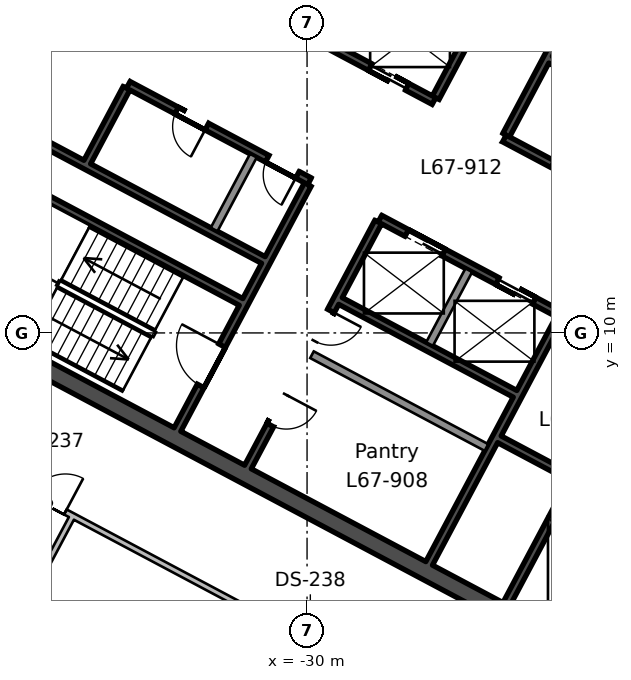
"""IFC4 building model, lengths in metres.
Left out: names, types, materials, properties, quantities, classifications, styles, units other than length and angle.
Written with IfcOpenShell. Run it as: python <this file> out.ifc"""

import sys

from ifc_helpers import new_model, si_unit, direction, frame, frame_2d, origin, place, context, subcontext, project, spatial, rectangle, extrude, element, fill, save


model = new_model("IFC4")
c1 = context("Model", 3, precision=1e-05, world=origin(), true_north=direction((0.0, 1.0)))
c2 = subcontext(c1, "Body", "Model", "MODEL_VIEW")
j1 = project(units=[si_unit("LENGTHUNIT", "METRE"), si_unit("PLANEANGLEUNIT", "RADIAN")], contexts=[c1])
p1 = place(None, origin())
s1 = spatial("IfcSite", under=j1, at=p1, CompositionType="ELEMENT")
p2 = place(p1, origin())
s2 = spatial("IfcBuilding", under=s1, at=p2, CompositionType="ELEMENT")
p3 = place(p2, frame((0.0, 0.0, 297.0)))
s3 = spatial("IfcBuildingStorey", under=s2, at=p3, CompositionType="ELEMENT", Elevation=297.0)
p4 = place(p3, frame((-32.004, 27.833, 0.0), z_axis=(0.0, 0.0, 1.0), x_axis=(-0.469467968382, -0.882949504028, 0.0)))
e1 = element("IfcWall", 1, at=p4, inside=s3, PredefinedType="SHEAR", context=c2, shape_type="SweptSolid", body=[
    extrude(rectangle(XDim=19.1, YDim=0.45, at=frame_2d((9.55, 0.0))), origin(), (0.0, 0.0, 1.0), 3.9),
])
p5 = place(p4, frame((10.15, 0.0, 0.0)))
e2 = element("IfcOpeningElement", 2, at=p5, cuts=e1, PredefinedType="OPENING", context=c2, shape_type="SweptSolid", body=[
    extrude(rectangle(XDim=2.4, YDim=2.4, at=frame_2d((1.2, 1.2))), frame((0.0, 0.235, 0.0), z_axis=(0.0, -1.0, 0.0), x_axis=(1.0, 0.0, 0.0)), (0.0, 0.0, 1.0), 0.47),
])
p6 = place(p3, frame((-22.832, 1.578, 0.0), z_axis=(0.0, 0.0, 1.0), x_axis=(-0.88294509198, 0.469476266226, 0.0)))
e3 = element("IfcWall", 3, at=p6, inside=s3, PredefinedType="SHEAR", context=c2, shape_type="SweptSolid", body=[
    extrude(rectangle(XDim=20.2, YDim=0.45, at=frame_2d((10.1, 0.0))), origin(), (0.0, 0.0, 1.0), 3.9),
])
p7 = place(p3, frame((-23.043, 6.08, 0.0), z_axis=(0.0, 0.0, 1.0), x_axis=(-0.469494272526, -0.882935517501, 0.0)))
e4 = element("IfcWall", 4, at=p7, inside=s3, PredefinedType="SHEAR", context=c2, shape_type="SweptSolid", body=[
    extrude(rectangle(XDim=3.65, YDim=0.2, at=frame_2d((1.825, 0.0))), origin(), (0.0, 0.0, 1.0), 3.9),
])
p8 = place(p3, frame((-23.36, 10.382, 0.0), z_axis=(0.0, 0.0, 1.0), x_axis=(-0.469480409012, -0.88294288918, 0.0)))
e5 = element("IfcWall", 5, at=p8, inside=s3, PredefinedType="SHEAR", context=c2, shape_type="SweptSolid", body=[
    extrude(rectangle(XDim=7.3, YDim=0.2, at=frame_2d((3.65, 0.0))), origin(), (0.0, 0.0, 1.0), 3.9),
])
p9 = place(p3, frame((-25.744, 11.65, 0.0), z_axis=(0.0, 0.0, 1.0), x_axis=(-0.469487830541, -0.882938942948, 0.0)))
e6 = element("IfcWall", 6, at=p9, inside=s3, PredefinedType="SOLIDWALL", context=c2, shape_type="SweptSolid", body=[
    extrude(rectangle(XDim=2.2, YDim=0.2, at=frame_2d((1.1, 0.0))), origin(), (0.0, 0.0, 1.0), 3.9),
])
p10 = place(p3, frame((-21.333, 21.649, 0.0), z_axis=(0.0, 0.0, 1.0), x_axis=(-0.469494272526, -0.882935517501, 0.0)))
e7 = element("IfcWall", 7, at=p10, inside=s3, PredefinedType="SHEAR", context=c2, shape_type="SweptSolid", body=[
    extrude(rectangle(XDim=7.3, YDim=0.2, at=frame_2d((3.65, 0.0))), origin(), (0.0, 0.0, 1.0), 3.9),
])
p11 = place(p10, frame((1.3, 0.0, 0.0)))
e8 = element("IfcOpeningElement", 8, at=p11, cuts=e7, PredefinedType="OPENING", context=c2, shape_type="SweptSolid", body=[
    extrude(rectangle(XDim=1.2, YDim=2.1, at=frame_2d((0.6, 1.05))), frame((0.0, 0.11, 0.0), z_axis=(0.0, -1.0, 0.0), x_axis=(1.0, 0.0, 0.0)), (0.0, 0.0, 1.0), 0.22),
])
p12 = place(p3, frame((-28.128, 12.917, 0.0), z_axis=(0.0, 0.0, 1.0), x_axis=(-0.469454336211, -0.882956752176, 0.0)))
e9 = element("IfcWall", 9, at=p12, inside=s3, PredefinedType="SHEAR", context=c2, shape_type="SweptSolid", body=[
    extrude(rectangle(XDim=7.3, YDim=0.2, at=frame_2d((3.65, 0.0))), origin(), (0.0, 0.0, 1.0), 3.9),
])
p13 = place(p12, frame((2.65, 0.0, 0.0)))
e10 = element("IfcOpeningElement", 10, at=p13, cuts=e9, PredefinedType="OPENING", context=c2, shape_type="SweptSolid", body=[
    extrude(rectangle(XDim=0.9, YDim=2.1, at=frame_2d((0.45, 1.05))), frame((0.0, 0.11, 0.0), z_axis=(0.0, -1.0, 0.0), x_axis=(1.0, 0.0, 0.0)), (0.0, 0.0, 1.0), 0.22),
])
p14 = place(p12, frame((5.15, 0.0, 0.0)))
e11 = element("IfcOpeningElement", 11, at=p14, cuts=e9, PredefinedType="OPENING", context=c2, shape_type="SweptSolid", body=[
    extrude(rectangle(XDim=0.9, YDim=2.1, at=frame_2d((0.45, 1.05))), frame((0.0, 0.11, 0.0), z_axis=(0.0, -1.0, 0.0), x_axis=(1.0, 0.0, 0.0)), (0.0, 0.0, 1.0), 0.22),
])
p15 = place(p3, frame((-23.188, 22.635, 0.0), z_axis=(0.0, 0.0, 1.0), x_axis=(-0.469454336211, -0.882956752176, 0.0)))
e12 = element("IfcWall", 12, at=p15, inside=s3, PredefinedType="SHEAR", context=c2, shape_type="SweptSolid", body=[
    extrude(rectangle(XDim=7.3, YDim=0.2, at=frame_2d((3.65, 0.0))), origin(), (0.0, 0.0, 1.0), 3.9),
])
p16 = place(p15, frame((0.4, 0.0, 0.0)))
e13 = element("IfcOpeningElement", 13, at=p16, cuts=e12, PredefinedType="OPENING", context=c2, shape_type="SweptSolid", body=[
    extrude(rectangle(XDim=0.9, YDim=2.1, at=frame_2d((0.45, 1.05))), frame((0.0, 0.11, 0.0), z_axis=(0.0, -1.0, 0.0), x_axis=(1.0, 0.0, 0.0)), (0.0, 0.0, 1.0), 0.22),
])
p17 = place(p15, frame((2.1, 0.0, 0.0)))
e14 = element("IfcOpeningElement", 14, at=p17, cuts=e12, PredefinedType="OPENING", context=c2, shape_type="SweptSolid", body=[
    extrude(rectangle(XDim=0.9, YDim=2.1, at=frame_2d((0.45, 1.05))), frame((0.0, 0.11, 0.0), z_axis=(0.0, -1.0, 0.0), x_axis=(1.0, 0.0, 0.0)), (0.0, 0.0, 1.0), 0.22),
])
p18 = place(p15, frame((3.75, 0.0, 0.0)))
e15 = element("IfcOpeningElement", 15, at=p18, cuts=e12, PredefinedType="OPENING", context=c2, shape_type="SweptSolid", body=[
    extrude(rectangle(XDim=0.9, YDim=2.1, at=frame_2d((0.45, 1.05))), frame((0.0, 0.11, 0.0), z_axis=(0.0, -1.0, 0.0), x_axis=(1.0, 0.0, 0.0)), (0.0, 0.0, 1.0), 0.22),
])
p19 = place(p3, frame((-29.982, 13.903, 0.0), z_axis=(0.0, 0.0, 1.0), x_axis=(-0.469454336211, -0.882956752176, 0.0)))
e16 = element("IfcWall", 16, at=p19, inside=s3, PredefinedType="SHEAR", context=c2, shape_type="SweptSolid", body=[
    extrude(rectangle(XDim=7.3, YDim=0.2, at=frame_2d((3.65, 0.0))), origin(), (0.0, 0.0, 1.0), 3.9),
])
p20 = place(p19, frame((4.8, 0.0, 0.0)))
e17 = element("IfcOpeningElement", 17, at=p20, cuts=e16, PredefinedType="OPENING", context=c2, shape_type="SweptSolid", body=[
    extrude(rectangle(XDim=1.2, YDim=2.1, at=frame_2d((0.6, 1.05))), frame((0.0, 0.11, 0.0), z_axis=(0.0, -1.0, 0.0), x_axis=(1.0, 0.0, 0.0)), (0.0, 0.0, 1.0), 0.22),
])
p21 = place(p3, frame((-31.413, 14.664, 0.0), z_axis=(0.0, 0.0, 1.0), x_axis=(-0.469533832133, -0.882914480843, 0.0)))
e18 = element("IfcWall", 18, at=p21, inside=s3, PredefinedType="SOLIDWALL", context=c2, shape_type="SweptSolid", body=[
    extrude(rectangle(XDim=2.2, YDim=0.2, at=frame_2d((1.1, 0.0))), origin(), (0.0, 0.0, 1.0), 3.9),
])
p22 = place(p3, frame((-34.75, 16.438, 0.0), z_axis=(0.0, 0.0, 1.0), x_axis=(-0.469401318492, -0.882984938828, 0.0)))
e19 = element("IfcWall", 19, at=p22, inside=s3, PredefinedType="SHEAR", context=c2, shape_type="SweptSolid", body=[
    extrude(rectangle(XDim=2.2, YDim=0.2, at=frame_2d((1.1, 0.0))), origin(), (0.0, 0.0, 1.0), 3.9),
])
p23 = place(p3, frame((-16.529, 13.432, 0.0), z_axis=(0.0, 0.0, 1.0), x_axis=(-0.88295287151, 0.469461634952, 0.0)))
e20 = element("IfcWall", 20, at=p23, inside=s3, PredefinedType="SHEAR", context=c2, shape_type="SweptSolid", body=[
    extrude(rectangle(XDim=8.0, YDim=0.2, at=frame_2d((4.0, 0.0))), origin(), (0.0, 0.0, 1.0), 3.9),
])
p24 = place(p3, frame((-20.04, 12.581, 0.0), z_axis=(0.0, 0.0, 1.0), x_axis=(-0.882942972946, 0.469480251476, 0.0)))
e21 = element("IfcWall", 21, at=p24, inside=s3, PredefinedType="SHEAR", context=c2, shape_type="SweptSolid", body=[
    extrude(rectangle(XDim=5.4, YDim=0.2, at=frame_2d((2.7, 0.0))), origin(), (0.0, 0.0, 1.0), 3.9),
])
p25 = place(p24, frame((0.36, 0.0, 0.0)))
e22 = element("IfcOpeningElement", 22, at=p25, cuts=e21, PredefinedType="OPENING", context=c2, shape_type="SweptSolid", body=[
    extrude(rectangle(XDim=0.9, YDim=2.1, at=frame_2d((0.45, 1.05))), frame((0.0, 0.11, 0.0), z_axis=(0.0, -1.0, 0.0), x_axis=(1.0, 0.0, 0.0)), (0.0, 0.0, 1.0), 0.22),
])
p26 = place(p24, frame((3.06, 0.0, 0.0)))
e23 = element("IfcOpeningElement", 23, at=p26, cuts=e21, PredefinedType="OPENING", context=c2, shape_type="SweptSolid", body=[
    extrude(rectangle(XDim=0.9, YDim=2.1, at=frame_2d((0.45, 1.05))), frame((0.0, 0.11, 0.0), z_axis=(0.0, -1.0, 0.0), x_axis=(1.0, 0.0, 0.0)), (0.0, 0.0, 1.0), 0.22),
])
p27 = place(p3, frame((-26.662, 16.102, 0.0), z_axis=(0.0, 0.0, 1.0), x_axis=(-0.882940221191, 0.469485426614, 0.0)))
e24 = element("IfcWall", 24, at=p27, inside=s3, PredefinedType="SHEAR", context=c2, shape_type="SweptSolid", body=[
    extrude(rectangle(XDim=10.0, YDim=0.2, at=frame_2d((5.0, 0.0))), origin(), (0.0, 0.0, 1.0), 3.9),
])
p28 = place(p27, frame((6.3, 0.0, 0.0)))
e25 = element("IfcOpeningElement", 25, at=p28, cuts=e24, PredefinedType="OPENING", context=c2, shape_type="SweptSolid", body=[
    extrude(rectangle(XDim=1.2, YDim=2.1, at=frame_2d((0.6, 1.05))), frame((0.0, 0.11, 0.0), z_axis=(0.0, -1.0, 0.0), x_axis=(1.0, 0.0, 0.0)), (0.0, 0.0, 1.0), 0.22),
])
p29 = place(p27, frame((0.8, 0.0, 0.0)))
e26 = element("IfcOpeningElement", 26, at=p29, cuts=e24, PredefinedType="OPENING", context=c2, shape_type="SweptSolid", body=[
    extrude(rectangle(XDim=1.1, YDim=2.1, at=frame_2d((0.55, 1.05))), frame((0.0, 0.11, 0.0), z_axis=(0.0, -1.0, 0.0), x_axis=(1.0, 0.0, 0.0)), (0.0, 0.0, 1.0), 0.22),
])
p30 = place(p27, frame((3.5, 0.0, 0.0)))
e27 = element("IfcOpeningElement", 27, at=p30, cuts=e24, PredefinedType="OPENING", context=c2, shape_type="SweptSolid", body=[
    extrude(rectangle(XDim=1.1, YDim=2.1, at=frame_2d((0.55, 1.05))), frame((0.0, 0.11, 0.0), z_axis=(0.0, -1.0, 0.0), x_axis=(1.0, 0.0, 0.0)), (0.0, 0.0, 1.0), 0.22),
])
p31 = place(p3, frame((-19.252, 8.311, 0.0), z_axis=(0.0, 0.0, 1.0), x_axis=(-0.882955722218, 0.469456273365, 0.0)))
e28 = element("IfcWall", 28, at=p31, inside=s3, PredefinedType="SHEAR", context=c2, shape_type="SweptSolid", body=[
    extrude(rectangle(XDim=10.0, YDim=0.2, at=frame_2d((5.0, 0.0))), origin(), (0.0, 0.0, 1.0), 3.9),
])
p32 = place(p31, frame((2.1, 0.0, 0.0)))
e29 = element("IfcOpeningElement", 29, at=p32, cuts=e28, PredefinedType="OPENING", context=c2, shape_type="SweptSolid", body=[
    extrude(rectangle(XDim=1.2, YDim=2.1, at=frame_2d((0.6, 1.05))), frame((0.0, 0.11, 0.0), z_axis=(0.0, -1.0, 0.0), x_axis=(1.0, 0.0, 0.0)), (0.0, 0.0, 1.0), 0.22),
])
p33 = place(p31, frame((5.4, 0.0, 0.0)))
e30 = element("IfcOpeningElement", 30, at=p33, cuts=e28, PredefinedType="OPENING", context=c2, shape_type="SweptSolid", body=[
    extrude(rectangle(XDim=1.1, YDim=2.1, at=frame_2d((0.55, 1.05))), frame((0.0, 0.11, 0.0), z_axis=(0.0, -1.0, 0.0), x_axis=(1.0, 0.0, 0.0)), (0.0, 0.0, 1.0), 0.22),
])
p34 = place(p31, frame((8.1, 0.0, 0.0)))
e31 = element("IfcOpeningElement", 31, at=p34, cuts=e28, PredefinedType="OPENING", context=c2, shape_type="SweptSolid", body=[
    extrude(rectangle(XDim=1.1, YDim=2.1, at=frame_2d((0.55, 1.05))), frame((0.0, 0.11, 0.0), z_axis=(0.0, -1.0, 0.0), x_axis=(1.0, 0.0, 0.0)), (0.0, 0.0, 1.0), 0.22),
])
p35 = place(p3, frame((-29.935, 13.991, 0.0), z_axis=(0.0, 0.0, 1.0), x_axis=(-0.882952937579, 0.469461510692, 0.0)))
e32 = element("IfcWall", 32, at=p35, inside=s3, PredefinedType="SHEAR", context=c2, shape_type="SweptSolid", body=[
    extrude(rectangle(XDim=5.4, YDim=0.2, at=frame_2d((2.7, 0.0))), origin(), (0.0, 0.0, 1.0), 3.9),
])
p36 = place(p35, frame((0.36, 0.0, 0.0)))
e33 = element("IfcOpeningElement", 33, at=p36, cuts=e32, PredefinedType="OPENING", context=c2, shape_type="SweptSolid", body=[
    extrude(rectangle(XDim=0.9, YDim=2.1, at=frame_2d((0.45, 1.05))), frame((0.0, 0.11, 0.0), z_axis=(0.0, -1.0, 0.0), x_axis=(1.0, 0.0, 0.0)), (0.0, 0.0, 1.0), 0.22),
])
p37 = place(p35, frame((3.06, 0.0, 0.0)))
e34 = element("IfcOpeningElement", 34, at=p37, cuts=e32, PredefinedType="OPENING", context=c2, shape_type="SweptSolid", body=[
    extrude(rectangle(XDim=0.9, YDim=2.1, at=frame_2d((0.45, 1.05))), frame((0.0, 0.11, 0.0), z_axis=(0.0, -1.0, 0.0), x_axis=(1.0, 0.0, 0.0)), (0.0, 0.0, 1.0), 0.22),
])
p38 = place(p3, frame((-24.528, 8.398, 0.0), z_axis=(0.0, 0.0, 1.0), x_axis=(-0.882953967957, 0.469459572775, 0.0)))
e35 = element("IfcWall", 35, at=p38, inside=s3, PredefinedType="SHEAR", context=c2, shape_type="SweptSolid", body=[
    extrude(rectangle(XDim=5.2, YDim=0.2, at=frame_2d((2.6, 0.0))), origin(), (0.0, 0.0, 1.0), 3.9),
])
p39 = place(p3, frame((-31.15, 11.919, 0.0), z_axis=(0.0, 0.0, 1.0), x_axis=(-0.882940221191, 0.469485426614, 0.0)))
e36 = element("IfcWall", 36, at=p39, inside=s3, PredefinedType="SHEAR", context=c2, shape_type="SweptSolid", body=[
    extrude(rectangle(XDim=8.0, YDim=0.2, at=frame_2d((4.0, 0.0))), origin(), (0.0, 0.0, 1.0), 3.9),
])
p40 = place(p3, frame((-20.965, 5.088, 0.0), z_axis=(0.0, 0.0, 1.0), x_axis=(-0.882925986334, 0.469512196493, 0.0)))
e37 = element("IfcWall", 37, at=p40, inside=s3, PredefinedType="SHEAR", context=c2, shape_type="SweptSolid", body=[
    extrude(rectangle(XDim=4.5, YDim=0.2, at=frame_2d((2.25, 0.0))), origin(), (0.0, 0.0, 1.0), 3.9),
])
p41 = place(p40, frame((0.6, 0.0, 0.0)))
e38 = element("IfcOpeningElement", 38, at=p41, cuts=e37, PredefinedType="OPENING", context=c2, shape_type="SweptSolid", body=[
    extrude(rectangle(XDim=1.1, YDim=2.1, at=frame_2d((0.55, 1.05))), frame((0.0, 0.11, 0.0), z_axis=(0.0, -1.0, 0.0), x_axis=(1.0, 0.0, 0.0)), (0.0, 0.0, 1.0), 0.22),
])
p42 = place(p3, frame((-31.737, 10.816, 0.0), z_axis=(0.0, 0.0, 1.0), x_axis=(-0.882940221191, 0.469485426614, 0.0)))
e39 = element("IfcWall", 39, at=p42, inside=s3, PredefinedType="SHEAR", context=c2, shape_type="SweptSolid", body=[
    extrude(rectangle(XDim=8.0, YDim=0.2, at=frame_2d((4.0, 0.0))), origin(), (0.0, 0.0, 1.0), 3.9),
])
p43 = place(p3, frame((-25.28, 6.986, 0.0), z_axis=(0.0, 0.0, 1.0), x_axis=(-0.882934506056, 0.469496174655, 0.0)))
e40 = element("IfcWall", 40, at=p43, inside=s3, PredefinedType="SOLIDWALL", context=c2, shape_type="SweptSolid", body=[
    extrude(rectangle(XDim=5.2, YDim=0.2, at=frame_2d((2.6, 0.0))), origin(), (0.0, 0.0, 1.0), 3.9),
])
p44 = place(p3, frame((-36.166, 5.186, 0.0), z_axis=(0.0, 0.0, 1.0), x_axis=(-0.469445946219, -0.882961212952, 0.0)))
e41 = element("IfcWall", 41, at=p44, inside=s3, PredefinedType="PARTITIONING", context=c2, shape_type="SweptSolid", body=[
    extrude(rectangle(XDim=8.8, YDim=0.15, at=frame_2d((4.4, 0.0))), origin(), (0.0, 0.0, 1.0), 3.54),
])
p45 = place(p3, frame((-48.541, 39.854, 0.0), z_axis=(0.0, 0.0, 1.0), x_axis=(0.882945008423, -0.469476423372, 0.0)))
e42 = element("IfcWall", 42, at=p45, inside=s3, PredefinedType="PARTITIONING", context=c2, shape_type="SweptSolid", body=[
    extrude(rectangle(XDim=54.976, YDim=0.15, at=frame_2d((27.488, 0.0))), origin(), (0.0, 0.0, 1.0), 3.54),
])
p46 = place(p45, frame((39.35, 0.0, 0.0)))
e43 = element("IfcOpeningElement", 43, at=p46, cuts=e42, PredefinedType="OPENING", context=c2, shape_type="SweptSolid", body=[
    extrude(rectangle(XDim=1.0, YDim=2.1, at=frame_2d((0.5, 1.05))), frame((0.0, 0.085, 0.0), z_axis=(0.0, -1.0, 0.0), x_axis=(1.0, 0.0, 0.0)), (0.0, 0.0, 1.0), 0.17),
])
p47 = place(p45, frame((26.95, 0.0, 0.0)))
e44 = element("IfcOpeningElement", 44, at=p47, cuts=e42, PredefinedType="OPENING", context=c2, shape_type="SweptSolid", body=[
    extrude(rectangle(XDim=1.0, YDim=2.1, at=frame_2d((0.5, 1.05))), frame((0.0, 0.085, 0.0), z_axis=(0.0, -1.0, 0.0), x_axis=(1.0, 0.0, 0.0)), (0.0, 0.0, 1.0), 0.17),
])
p48 = place(p45, frame((21.049, 0.0, 0.0)))
e45 = element("IfcOpeningElement", 45, at=p48, cuts=e42, PredefinedType="OPENING", context=c2, shape_type="SweptSolid", body=[
    extrude(rectangle(XDim=1.0, YDim=2.1, at=frame_2d((0.5, 1.05))), frame((0.0, 0.085, 0.0), z_axis=(0.0, -1.0, 0.0), x_axis=(1.0, 0.0, 0.0)), (0.0, 0.0, 1.0), 0.17),
])
p49 = place(p45, frame((15.35, 0.0, 0.0)))
e46 = element("IfcOpeningElement", 46, at=p49, cuts=e42, PredefinedType="OPENING", context=c2, shape_type="SweptSolid", body=[
    extrude(rectangle(XDim=1.0, YDim=2.1, at=frame_2d((0.5, 1.05))), frame((0.0, 0.085, 0.0), z_axis=(0.0, -1.0, 0.0), x_axis=(1.0, 0.0, 0.0)), (0.0, 0.0, 1.0), 0.17),
])
p50 = place(p3, frame((-34.155, 29.486, 0.0), z_axis=(0.0, 0.0, 1.0), x_axis=(-0.469446756585, -0.882960782103, 0.0)))
e47 = element("IfcWall", 47, at=p50, inside=s3, PredefinedType="PARTITIONING", context=c2, shape_type="SweptSolid", body=[
    extrude(rectangle(XDim=20.0, YDim=0.15, at=frame_2d((10.0, 0.0))), origin(), (0.0, 0.0, 1.0), 3.54),
])
p51 = place(p3, frame((-13.8, -6.706, 0.0), z_axis=(0.0, 0.0, 1.0), x_axis=(-0.882947286887, 0.469472138235, 0.0)))
e48 = element("IfcWall", 48, at=p51, inside=s3, PredefinedType="PARTITIONING", context=c2, shape_type="SweptSolid", body=[
    extrude(rectangle(XDim=36.571, YDim=0.15, at=frame_2d((18.285, 0.0))), origin(), (0.0, 0.0, 1.0), 3.54),
])
p52 = place(p51, frame((25.55, 0.0, 0.0)))
e49 = element("IfcOpeningElement", 49, at=p52, cuts=e48, PredefinedType="OPENING", context=c2, shape_type="SweptSolid", body=[
    extrude(rectangle(XDim=1.0, YDim=2.1, at=frame_2d((0.5, 1.05))), frame((0.0, 0.085, 0.0), z_axis=(0.0, -1.0, 0.0), x_axis=(1.0, 0.0, 0.0)), (0.0, 0.0, 1.0), 0.17),
])
p53 = place(p51, frame((17.75, 0.0, 0.0)))
e50 = element("IfcOpeningElement", 50, at=p53, cuts=e48, PredefinedType="OPENING", context=c2, shape_type="SweptSolid", body=[
    extrude(rectangle(XDim=1.0, YDim=2.1, at=frame_2d((0.5, 1.05))), frame((0.0, 0.085, 0.0), z_axis=(0.0, -1.0, 0.0), x_axis=(1.0, 0.0, 0.0)), (0.0, 0.0, 1.0), 0.17),
])
p54 = place(p51, frame((8.15, 0.0, 0.0)))
e51 = element("IfcOpeningElement", 51, at=p54, cuts=e48, PredefinedType="OPENING", context=c2, shape_type="SweptSolid", body=[
    extrude(rectangle(XDim=1.0, YDim=2.1, at=frame_2d((0.5, 1.05))), frame((0.0, 0.085, 0.0), z_axis=(0.0, -1.0, 0.0), x_axis=(1.0, 0.0, 0.0)), (0.0, 0.0, 1.0), 0.17),
])
p55 = place(p20, frame((1.2, 0.0, 0.0), z_axis=(0.0, 0.0, 1.0), x_axis=(-1.0, 0.0, 0.0)))
e52 = element("IfcDoor", 52, at=p55, inside=s3, OperationType="SINGLE_SWING_RIGHT", PredefinedType="DOOR", context=c2, shape_type="SweptSolid", body=[
    extrude(rectangle(XDim=1.2, YDim=2.1, at=frame_2d((0.6, 1.05))), frame((0.0, 0.025, 0.0), z_axis=(0.0, -1.0, 0.0), x_axis=(1.0, 0.0, 0.0)), (0.0, 0.0, 1.0), 0.05),
])
fill(e17, e52)
p56 = place(p36, origin())
e53 = element("IfcDoor", 53, at=p56, inside=s3, OperationType="SINGLE_SWING_LEFT", PredefinedType="DOOR", context=c2, shape_type="SweptSolid", body=[
    extrude(rectangle(XDim=0.9, YDim=2.1, at=frame_2d((0.45, 1.05))), frame((0.0, 0.025, 0.0), z_axis=(0.0, -1.0, 0.0), x_axis=(1.0, 0.0, 0.0)), (0.0, 0.0, 1.0), 0.05),
])
fill(e33, e53)
p57 = place(p37, origin())
e54 = element("IfcDoor", 54, at=p57, inside=s3, OperationType="SINGLE_SWING_LEFT", PredefinedType="DOOR", context=c2, shape_type="SweptSolid", body=[
    extrude(rectangle(XDim=0.9, YDim=2.1, at=frame_2d((0.45, 1.05))), frame((0.0, 0.025, 0.0), z_axis=(0.0, -1.0, 0.0), x_axis=(1.0, 0.0, 0.0)), (0.0, 0.0, 1.0), 0.05),
])
fill(e34, e54)
p58 = place(p33, origin())
e55 = element("IfcDoor", 55, at=p58, inside=s3, OperationType="DOUBLE_DOOR_SLIDING", PredefinedType="DOOR", context=c2, shape_type="SweptSolid", body=[
    extrude(rectangle(XDim=1.1, YDim=2.1, at=frame_2d((0.55, 1.05))), frame((0.0, 0.025, 0.0), z_axis=(0.0, -1.0, 0.0), x_axis=(1.0, 0.0, 0.0)), (0.0, 0.0, 1.0), 0.05),
])
fill(e30, e55)
p59 = place(p34, origin())
e56 = element("IfcDoor", 56, at=p59, inside=s3, OperationType="DOUBLE_DOOR_SLIDING", PredefinedType="DOOR", context=c2, shape_type="SweptSolid", body=[
    extrude(rectangle(XDim=1.1, YDim=2.1, at=frame_2d((0.55, 1.05))), frame((0.0, 0.025, 0.0), z_axis=(0.0, -1.0, 0.0), x_axis=(1.0, 0.0, 0.0)), (0.0, 0.0, 1.0), 0.05),
])
fill(e31, e56)
p60 = place(p29, origin())
e57 = element("IfcDoor", 57, at=p60, inside=s3, OperationType="DOUBLE_DOOR_SLIDING", PredefinedType="DOOR", context=c2, shape_type="SweptSolid", body=[
    extrude(rectangle(XDim=1.1, YDim=2.1, at=frame_2d((0.55, 1.05))), frame((0.0, 0.025, 0.0), z_axis=(0.0, -1.0, 0.0), x_axis=(1.0, 0.0, 0.0)), (0.0, 0.0, 1.0), 0.05),
])
fill(e26, e57)
p61 = place(p13, origin())
e58 = element("IfcDoor", 58, at=p61, inside=s3, OperationType="SINGLE_SWING_LEFT", PredefinedType="DOOR", context=c2, shape_type="SweptSolid", body=[
    extrude(rectangle(XDim=0.9, YDim=2.1, at=frame_2d((0.45, 1.05))), frame((0.0, 0.025, 0.0), z_axis=(0.0, -1.0, 0.0), x_axis=(1.0, 0.0, 0.0)), (0.0, 0.0, 1.0), 0.05),
])
fill(e10, e58)
p62 = place(p14, origin())
e59 = element("IfcDoor", 59, at=p62, inside=s3, OperationType="SINGLE_SWING_LEFT", PredefinedType="DOOR", context=c2, shape_type="SweptSolid", body=[
    extrude(rectangle(XDim=0.9, YDim=2.1, at=frame_2d((0.45, 1.05))), frame((0.0, 0.025, 0.0), z_axis=(0.0, -1.0, 0.0), x_axis=(1.0, 0.0, 0.0)), (0.0, 0.0, 1.0), 0.05),
])
fill(e11, e59)
p63 = place(p52, frame((1.0, 0.0, 0.0), z_axis=(0.0, 0.0, 1.0), x_axis=(-1.0, 0.0, 0.0)))
e60 = element("IfcDoor", 60, at=p63, inside=s3, OperationType="SINGLE_SWING_RIGHT", PredefinedType="DOOR", context=c2, shape_type="SweptSolid", body=[
    extrude(rectangle(XDim=1.0, YDim=2.1, at=frame_2d((0.5, 1.05))), frame((0.0, 0.025, 0.0), z_axis=(0.0, -1.0, 0.0), x_axis=(1.0, 0.0, 0.0)), (0.0, 0.0, 1.0), 0.05),
])
fill(e49, e60)
save(model, sys.argv[1])
